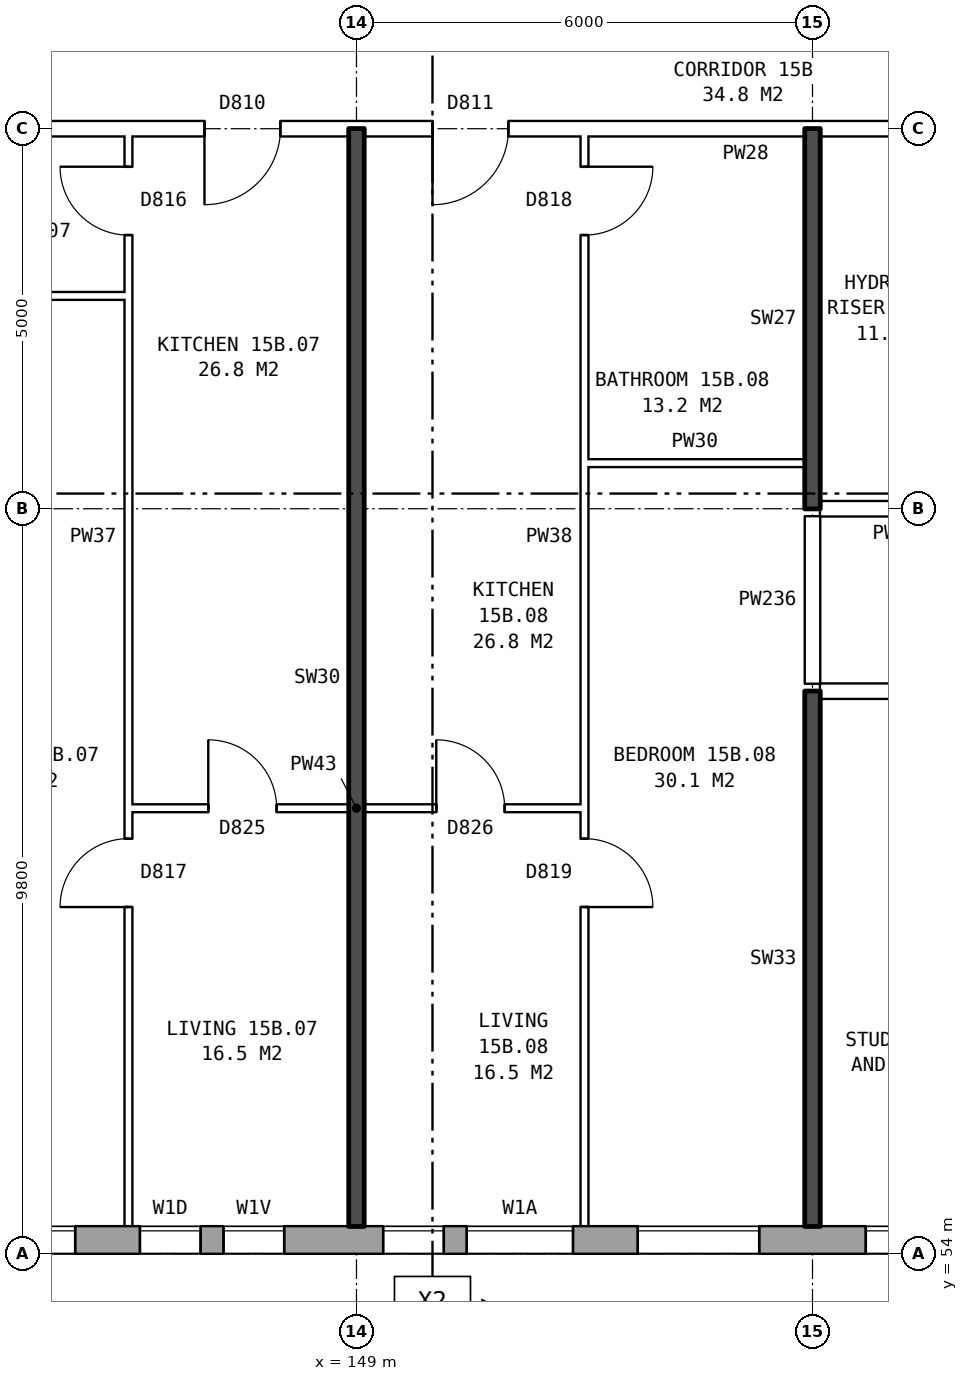
"""IFC4 building model, lengths in metres.
Left out: names, types, materials, properties, quantities, classifications, styles, units other than length and angle.
Written with IfcOpenShell. Run it as: python <this file> out.ifc"""

import sys

from ifc_helpers import new_model, si_unit, direction, frame, frame_2d, origin, place, context, subcontext, project, spatial, rectangle, extrude, element, fill, save


model = new_model("IFC4")
c1 = context("Model", 3, precision=1e-05, world=origin(), true_north=direction((0.0, 1.0)))
c2 = subcontext(c1, "Body", "Model", "MODEL_VIEW")
j1 = project(units=[si_unit("LENGTHUNIT", "METRE"), si_unit("PLANEANGLEUNIT", "RADIAN")], contexts=[c1])
p1 = place(None, origin())
s1 = spatial("IfcSite", under=j1, at=p1, CompositionType="ELEMENT")
p2 = place(p1, origin())
s2 = spatial("IfcBuilding", under=s1, at=p2, CompositionType="ELEMENT")
p3 = place(p2, frame((0.0, 0.0, 56.7)))
s3 = spatial("IfcBuildingStorey", under=s2, at=p3, CompositionType="ELEMENT", Elevation=56.7)
p4 = place(p3, frame((134.075, 54.18, 0.0), z_axis=(0.0, 0.0, 1.0), x_axis=(1.0, 0.0, 0.0)))
e1 = element("IfcWall", 1, at=p4, inside=s3, PredefinedType="STANDARD", context=c2, shape_type="SweptSolid", body=[
    extrude(rectangle(XDim=39.351, YDim=0.36, at=frame_2d((19.675, 0.0))), origin(), (0.0, 0.0, 1.0), 2.85),
])
p5 = place(p4, frame((0.625, 0.0, 0.8)))
e2 = element("IfcOpeningElement", 2, at=p5, cuts=e1, PredefinedType="OPENING", context=c2, shape_type="SweptSolid", body=[
    extrude(rectangle(XDim=1.6, YDim=1.8, at=frame_2d((0.8, 0.9))), frame((0.0, 0.19, 0.0), z_axis=(0.0, -1.0, 0.0), x_axis=(1.0, 0.0, 0.0)), (0.0, 0.0, 1.0), 0.38),
])
p6 = place(p4, frame((3.625, 0.0, 0.8)))
e3 = element("IfcOpeningElement", 3, at=p6, cuts=e1, PredefinedType="OPENING", context=c2, shape_type="SweptSolid", body=[
    extrude(rectangle(XDim=1.6, YDim=1.8, at=frame_2d((0.8, 0.9))), frame((0.0, 0.19, 0.0), z_axis=(0.0, -1.0, 0.0), x_axis=(1.0, 0.0, 0.0)), (0.0, 0.0, 1.0), 0.38),
])
p7 = place(p4, frame((6.625, 0.0, 0.8)))
e4 = element("IfcOpeningElement", 4, at=p7, cuts=e1, PredefinedType="OPENING", context=c2, shape_type="SweptSolid", body=[
    extrude(rectangle(XDim=1.6, YDim=1.8, at=frame_2d((0.8, 0.9))), frame((0.0, 0.19, 0.0), z_axis=(0.0, -1.0, 0.0), x_axis=(1.0, 0.0, 0.0)), (0.0, 0.0, 1.0), 0.38),
])
p8 = place(p4, frame((9.625, 0.0, 0.8)))
e5 = element("IfcOpeningElement", 5, at=p8, cuts=e1, PredefinedType="OPENING", context=c2, shape_type="SweptSolid", body=[
    extrude(rectangle(XDim=1.6, YDim=1.8, at=frame_2d((0.8, 0.9))), frame((0.0, 0.19, 0.0), z_axis=(0.0, -1.0, 0.0), x_axis=(1.0, 0.0, 0.0)), (0.0, 0.0, 1.0), 0.38),
])
p9 = place(p4, frame((12.075, 0.0, 0.8)))
e6 = element("IfcOpeningElement", 6, at=p9, cuts=e1, PredefinedType="OPENING", context=c2, shape_type="SweptSolid", body=[
    extrude(rectangle(XDim=0.8, YDim=1.8, at=frame_2d((0.4, 0.9))), frame((0.0, 0.19, 0.0), z_axis=(0.0, -1.0, 0.0), x_axis=(1.0, 0.0, 0.0)), (0.0, 0.0, 1.0), 0.38),
])
p10 = place(p4, frame((15.275, 0.0, 0.8)))
e7 = element("IfcOpeningElement", 7, at=p10, cuts=e1, PredefinedType="OPENING", context=c2, shape_type="SweptSolid", body=[
    extrude(rectangle(XDim=0.8, YDim=0.9, at=frame_2d((0.4, 0.45))), frame((0.0, 0.19, 0.0), z_axis=(0.0, -1.0, 0.0), x_axis=(1.0, 0.0, 0.0)), (0.0, 0.0, 1.0), 0.38),
])
p11 = place(p4, frame((18.625, 0.0, 0.8)))
e8 = element("IfcOpeningElement", 8, at=p11, cuts=e1, PredefinedType="OPENING", context=c2, shape_type="SweptSolid", body=[
    extrude(rectangle(XDim=1.6, YDim=1.8, at=frame_2d((0.8, 0.9))), frame((0.0, 0.19, 0.0), z_axis=(0.0, -1.0, 0.0), x_axis=(1.0, 0.0, 0.0)), (0.0, 0.0, 1.0), 0.38),
])
p12 = place(p4, frame((21.625, 0.0, 0.8)))
e9 = element("IfcOpeningElement", 9, at=p12, cuts=e1, PredefinedType="OPENING", context=c2, shape_type="SweptSolid", body=[
    extrude(rectangle(XDim=1.6, YDim=1.8, at=frame_2d((0.8, 0.9))), frame((0.0, 0.19, 0.0), z_axis=(0.0, -1.0, 0.0), x_axis=(1.0, 0.0, 0.0)), (0.0, 0.0, 1.0), 0.38),
])
p13 = place(p4, frame((25.275, 0.0, 1.7)))
e10 = element("IfcOpeningElement", 10, at=p13, cuts=e1, PredefinedType="OPENING", context=c2, shape_type="SweptSolid", body=[
    extrude(rectangle(XDim=1.4, YDim=0.9, at=frame_2d((0.7, 0.45))), frame((0.0, 0.19, 0.0), z_axis=(0.0, -1.0, 0.0), x_axis=(1.0, 0.0, 0.0)), (0.0, 0.0, 1.0), 0.38),
])
p14 = place(p4, frame((27.625, 0.0, 0.8)))
e11 = element("IfcOpeningElement", 11, at=p14, cuts=e1, PredefinedType="OPENING", context=c2, shape_type="SweptSolid", body=[
    extrude(rectangle(XDim=1.6, YDim=1.8, at=frame_2d((0.8, 0.9))), frame((0.0, 0.19, 0.0), z_axis=(0.0, -1.0, 0.0), x_axis=(1.0, 0.0, 0.0)), (0.0, 0.0, 1.0), 0.38),
])
p15 = place(p4, frame((30.625, 0.0, 0.8)))
e12 = element("IfcOpeningElement", 12, at=p15, cuts=e1, PredefinedType="OPENING", context=c2, shape_type="SweptSolid", body=[
    extrude(rectangle(XDim=1.6, YDim=1.8, at=frame_2d((0.8, 0.9))), frame((0.0, 0.19, 0.0), z_axis=(0.0, -1.0, 0.0), x_axis=(1.0, 0.0, 0.0)), (0.0, 0.0, 1.0), 0.38),
])
p16 = place(p4, frame((33.625, 0.0, 0.8)))
e13 = element("IfcOpeningElement", 13, at=p16, cuts=e1, PredefinedType="OPENING", context=c2, shape_type="SweptSolid", body=[
    extrude(rectangle(XDim=1.6, YDim=1.8, at=frame_2d((0.8, 0.9))), frame((0.0, 0.19, 0.0), z_axis=(0.0, -1.0, 0.0), x_axis=(1.0, 0.0, 0.0)), (0.0, 0.0, 1.0), 0.38),
])
p17 = place(p4, frame((36.625, 0.0, 0.8)))
e14 = element("IfcOpeningElement", 14, at=p17, cuts=e1, PredefinedType="OPENING", context=c2, shape_type="SweptSolid", body=[
    extrude(rectangle(XDim=1.6, YDim=1.8, at=frame_2d((0.8, 0.9))), frame((0.0, 0.19, 0.0), z_axis=(0.0, -1.0, 0.0), x_axis=(1.0, 0.0, 0.0)), (0.0, 0.0, 1.0), 0.38),
])
p18 = place(p4, frame((13.175, 0.0, 1.7)))
e15 = element("IfcOpeningElement", 15, at=p18, cuts=e1, PredefinedType="OPENING", context=c2, shape_type="SweptSolid", body=[
    extrude(rectangle(XDim=0.8, YDim=0.9, at=frame_2d((0.4, 0.45))), frame((0.0, 0.19, 0.0), z_axis=(0.0, -1.0, 0.0), x_axis=(1.0, 0.0, 0.0)), (0.0, 0.0, 1.0), 0.38),
])
p19 = place(p4, frame((16.375, 0.0, 0.8)))
e16 = element("IfcOpeningElement", 16, at=p19, cuts=e1, PredefinedType="OPENING", context=c2, shape_type="SweptSolid", body=[
    extrude(rectangle(XDim=1.4, YDim=1.8, at=frame_2d((0.7, 0.9))), frame((0.0, 0.19, 0.0), z_axis=(0.0, -1.0, 0.0), x_axis=(1.0, 0.0, 0.0)), (0.0, 0.0, 1.0), 0.38),
])
p20 = place(p3, frame((146.0, 59.86, 0.0), z_axis=(0.0, 0.0, 1.0), x_axis=(1.0, 0.0, 0.0)))
e17 = element("IfcWall", 17, at=p20, inside=s3, PredefinedType="PARTITIONING", context=c2, shape_type="SweptSolid", body=[
    extrude(rectangle(XDim=6.0, YDim=0.1, at=frame_2d((3.0, 0.0))), origin(), (0.0, 0.0, 1.0), 2.85),
])
p21 = place(p20, frame((1.05, 0.0, 0.0)))
e18 = element("IfcOpeningElement", 18, at=p21, cuts=e17, PredefinedType="OPENING", context=c2, shape_type="SweptSolid", body=[
    extrude(rectangle(XDim=0.9, YDim=2.1, at=frame_2d((0.45, 1.05))), frame((0.0, 0.06, 0.0), z_axis=(0.0, -1.0, 0.0), x_axis=(1.0, 0.0, 0.0)), (0.0, 0.0, 1.0), 0.12),
])
p22 = place(p20, frame((4.05, 0.0, 0.0)))
e19 = element("IfcOpeningElement", 19, at=p22, cuts=e17, PredefinedType="OPENING", context=c2, shape_type="SweptSolid", body=[
    extrude(rectangle(XDim=0.9, YDim=2.1, at=frame_2d((0.45, 1.05))), frame((0.0, 0.06, 0.0), z_axis=(0.0, -1.0, 0.0), x_axis=(1.0, 0.0, 0.0)), (0.0, 0.0, 1.0), 0.12),
])
p23 = place(p3, frame((155.1, 61.4, 0.0), z_axis=(0.0, 0.0, 1.0), x_axis=(1.0, 0.0, 0.0)))
e20 = element("IfcWall", 20, at=p23, inside=s3, PredefinedType="PARTITIONING", context=c2, shape_type="SweptSolid", body=[
    extrude(rectangle(XDim=21.04, YDim=0.2, at=frame_2d((10.52, 0.0))), origin(), (0.0, 0.0, 1.0), 2.85),
])
p24 = place(p23, frame((1.45, 0.0, 0.0)))
e21 = element("IfcOpeningElement", 21, at=p24, cuts=e20, PredefinedType="OPENING", context=c2, shape_type="SweptSolid", body=[
    extrude(rectangle(XDim=1.0, YDim=2.1, at=frame_2d((0.5, 1.05))), frame((0.0, 0.11, 0.0), z_axis=(0.0, -1.0, 0.0), x_axis=(1.0, 0.0, 0.0)), (0.0, 0.0, 1.0), 0.22),
])
p25 = place(p23, frame((7.4, 0.0, 0.0)))
e22 = element("IfcOpeningElement", 22, at=p25, cuts=e20, PredefinedType="OPENING", context=c2, shape_type="SweptSolid", body=[
    extrude(rectangle(XDim=1.0, YDim=2.1, at=frame_2d((0.5, 1.05))), frame((0.0, 0.11, 0.0), z_axis=(0.0, -1.0, 0.0), x_axis=(1.0, 0.0, 0.0)), (0.0, 0.0, 1.0), 0.22),
])
p26 = place(p23, frame((14.4, 0.0, 0.0)))
e23 = element("IfcOpeningElement", 23, at=p26, cuts=e20, PredefinedType="OPENING", context=c2, shape_type="SweptSolid", body=[
    extrude(rectangle(XDim=1.0, YDim=2.1, at=frame_2d((0.5, 1.05))), frame((0.0, 0.11, 0.0), z_axis=(0.0, -1.0, 0.0), x_axis=(1.0, 0.0, 0.0)), (0.0, 0.0, 1.0), 0.22),
])
p27 = place(p3, frame((155.1, 63.8, 0.0), z_axis=(0.0, 0.0, 1.0), x_axis=(1.0, 0.0, 0.0)))
e24 = element("IfcWall", 24, at=p27, inside=s3, PredefinedType="PARTITIONING", context=c2, shape_type="SweptSolid", body=[
    extrude(rectangle(XDim=2.14, YDim=0.2, at=frame_2d((1.07, 0.0))), origin(), (0.0, 0.0, 1.0), 2.85),
])
p28 = place(p3, frame((152.0, 64.4, 0.0), z_axis=(0.0, 0.0, 1.0), x_axis=(1.0, 0.0, 0.0)))
e25 = element("IfcWall", 25, at=p28, inside=s3, PredefinedType="PARTITIONING", context=c2, shape_type="SweptSolid", body=[
    extrude(rectangle(XDim=2.9, YDim=0.1, at=frame_2d((1.45, 0.0))), origin(), (0.0, 0.0, 1.0), 2.85),
])
p29 = place(p3, frame((142.76, 66.6, 0.0), z_axis=(0.0, 0.0, 1.0), x_axis=(1.0, 0.0, 0.0)))
e26 = element("IfcWall", 26, at=p29, inside=s3, PredefinedType="PARTITIONING", context=c2, shape_type="SweptSolid", body=[
    extrude(rectangle(XDim=3.24, YDim=0.1, at=frame_2d((1.62, 0.0))), origin(), (0.0, 0.0, 1.0), 2.85),
])
p30 = place(p3, frame((142.76, 68.8, 0.0), z_axis=(0.0, 0.0, 1.0), x_axis=(1.0, 0.0, 0.0)))
e27 = element("IfcWall", 27, at=p30, inside=s3, PredefinedType="PARTITIONING", context=c2, shape_type="SweptSolid", body=[
    extrude(rectangle(XDim=14.48, YDim=0.2, at=frame_2d((7.24, 0.0))), origin(), (0.0, 0.0, 1.0), 2.85),
])
p31 = place(p30, frame((4.24, 0.0, 0.0)))
e28 = element("IfcOpeningElement", 28, at=p31, cuts=e27, PredefinedType="OPENING", context=c2, shape_type="SweptSolid", body=[
    extrude(rectangle(XDim=1.0, YDim=2.1, at=frame_2d((0.5, 1.05))), frame((0.0, 0.11, 0.0), z_axis=(0.0, -1.0, 0.0), x_axis=(1.0, 0.0, 0.0)), (0.0, 0.0, 1.0), 0.22),
])
p32 = place(p30, frame((7.24, 0.0, 0.0)))
e29 = element("IfcOpeningElement", 29, at=p32, cuts=e27, PredefinedType="OPENING", context=c2, shape_type="SweptSolid", body=[
    extrude(rectangle(XDim=1.0, YDim=2.1, at=frame_2d((0.5, 1.05))), frame((0.0, 0.11, 0.0), z_axis=(0.0, -1.0, 0.0), x_axis=(1.0, 0.0, 0.0)), (0.0, 0.0, 1.0), 0.22),
])
p33 = place(p3, frame((146.0, 54.36, 0.0), z_axis=(0.0, 0.0, 1.0), x_axis=(0.0, 1.0, 0.0)))
e30 = element("IfcWall", 30, at=p33, inside=s3, PredefinedType="PARTITIONING", context=c2, shape_type="SweptSolid", body=[
    extrude(rectangle(XDim=14.34, YDim=0.1, at=frame_2d((7.17, 0.0))), origin(), (0.0, 0.0, 1.0), 2.85),
])
p34 = place(p33, frame((4.2, 0.0, 0.0)))
e31 = element("IfcOpeningElement", 31, at=p34, cuts=e30, PredefinedType="OPENING", context=c2, shape_type="SweptSolid", body=[
    extrude(rectangle(XDim=0.9, YDim=2.1, at=frame_2d((0.45, 1.05))), frame((0.0, 0.06, 0.0), z_axis=(0.0, -1.0, 0.0), x_axis=(1.0, 0.0, 0.0)), (0.0, 0.0, 1.0), 0.12),
])
p35 = place(p33, frame((13.04, 0.0, 0.0)))
e32 = element("IfcOpeningElement", 32, at=p35, cuts=e30, PredefinedType="OPENING", context=c2, shape_type="SweptSolid", body=[
    extrude(rectangle(XDim=0.9, YDim=2.1, at=frame_2d((0.45, 1.05))), frame((0.0, 0.06, 0.0), z_axis=(0.0, -1.0, 0.0), x_axis=(1.0, 0.0, 0.0)), (0.0, 0.0, 1.0), 0.12),
])
p36 = place(p3, frame((149.0, 54.36, 0.0), z_axis=(0.0, 0.0, 1.0), x_axis=(0.0, 1.0, 0.0)))
e33 = element("IfcWall", 33, at=p36, inside=s3, PredefinedType="SOLIDWALL", context=c2, shape_type="SweptSolid", body=[
    extrude(rectangle(XDim=14.44, YDim=0.2, at=frame_2d((7.22, 0.0))), origin(), (0.0, 0.0, 1.0), 2.85),
])
p37 = place(p3, frame((152.0, 54.36, 0.0), z_axis=(0.0, 0.0, 1.0), x_axis=(0.0, 1.0, 0.0)))
e34 = element("IfcWall", 34, at=p37, inside=s3, PredefinedType="PARTITIONING", context=c2, shape_type="SweptSolid", body=[
    extrude(rectangle(XDim=14.34, YDim=0.1, at=frame_2d((7.17, 0.0))), origin(), (0.0, 0.0, 1.0), 2.85),
])
p38 = place(p37, frame((4.2, 0.0, 0.0)))
e35 = element("IfcOpeningElement", 35, at=p38, cuts=e34, PredefinedType="OPENING", context=c2, shape_type="SweptSolid", body=[
    extrude(rectangle(XDim=0.9, YDim=2.1, at=frame_2d((0.45, 1.05))), frame((0.0, 0.06, 0.0), z_axis=(0.0, -1.0, 0.0), x_axis=(1.0, 0.0, 0.0)), (0.0, 0.0, 1.0), 0.12),
])
p39 = place(p37, frame((13.04, 0.0, 0.0)))
e36 = element("IfcOpeningElement", 36, at=p39, cuts=e34, PredefinedType="OPENING", context=c2, shape_type="SweptSolid", body=[
    extrude(rectangle(XDim=0.9, YDim=2.1, at=frame_2d((0.45, 1.05))), frame((0.0, 0.06, 0.0), z_axis=(0.0, -1.0, 0.0), x_axis=(1.0, 0.0, 0.0)), (0.0, 0.0, 1.0), 0.12),
])
p40 = place(p3, frame((155.0, 54.36, 0.0), z_axis=(0.0, 0.0, 1.0), x_axis=(0.0, 1.0, 0.0)))
e37 = element("IfcWall", 37, at=p40, inside=s3, PredefinedType="SOLIDWALL", context=c2, shape_type="SweptSolid", body=[
    extrude(rectangle(XDim=7.04, YDim=0.2, at=frame_2d((3.52, 0.0))), origin(), (0.0, 0.0, 1.0), 2.85),
])
p41 = place(p3, frame((155.0, 61.5, 0.0), z_axis=(0.0, 0.0, 1.0), x_axis=(0.0, 1.0, 0.0)))
e38 = element("IfcWall", 38, at=p41, inside=s3, PredefinedType="PARTITIONING", context=c2, shape_type="SweptSolid", body=[
    extrude(rectangle(XDim=2.2, YDim=0.2, at=frame_2d((1.1, 0.0))), origin(), (0.0, 0.0, 1.0), 2.85),
])
p42 = place(p3, frame((155.0, 63.8, 0.0), z_axis=(0.0, 0.0, 1.0), x_axis=(0.0, 1.0, 0.0)))
e39 = element("IfcWall", 39, at=p42, inside=s3, PredefinedType="SOLIDWALL", context=c2, shape_type="SweptSolid", body=[
    extrude(rectangle(XDim=5.0, YDim=0.2, at=frame_2d((2.5, 0.0))), origin(), (0.0, 0.0, 1.0), 2.85),
])
p43 = place(p8, origin())
e40 = element("IfcWindow", 40, at=p43, inside=s3, PartitioningType="SINGLE_PANEL", PredefinedType="WINDOW", context=c2, shape_type="SweptSolid", body=[
    extrude(rectangle(XDim=1.6, YDim=1.8, at=frame_2d((0.8, 0.9))), frame((0.0, 0.15, 0.0), z_axis=(0.0, -1.0, 0.0), x_axis=(1.0, 0.0, 0.0)), (0.0, 0.0, 1.0), 0.06),
])
fill(e5, e40)
p44 = place(p9, origin())
e41 = element("IfcWindow", 41, at=p44, inside=s3, PartitioningType="SINGLE_PANEL", PredefinedType="WINDOW", context=c2, shape_type="SweptSolid", body=[
    extrude(rectangle(XDim=0.8, YDim=1.8, at=frame_2d((0.4, 0.9))), frame((0.0, 0.15, 0.0), z_axis=(0.0, -1.0, 0.0), x_axis=(1.0, 0.0, 0.0)), (0.0, 0.0, 1.0), 0.06),
])
fill(e6, e41)
p45 = place(p10, origin())
e42 = element("IfcWindow", 42, at=p45, inside=s3, PartitioningType="SINGLE_PANEL", PredefinedType="WINDOW", context=c2, shape_type="SweptSolid", body=[
    extrude(rectangle(XDim=0.8, YDim=0.9, at=frame_2d((0.4, 0.45))), frame((0.0, 0.15, 0.0), z_axis=(0.0, -1.0, 0.0), x_axis=(1.0, 0.0, 0.0)), (0.0, 0.0, 1.0), 0.06),
])
fill(e7, e42)
p46 = place(p11, origin())
e43 = element("IfcWindow", 43, at=p46, inside=s3, PartitioningType="SINGLE_PANEL", PredefinedType="WINDOW", context=c2, shape_type="SweptSolid", body=[
    extrude(rectangle(XDim=1.6, YDim=1.8, at=frame_2d((0.8, 0.9))), frame((0.0, 0.15, 0.0), z_axis=(0.0, -1.0, 0.0), x_axis=(1.0, 0.0, 0.0)), (0.0, 0.0, 1.0), 0.06),
])
fill(e8, e43)
p47 = place(p12, origin())
e44 = element("IfcWindow", 44, at=p47, inside=s3, PartitioningType="SINGLE_PANEL", PredefinedType="WINDOW", context=c2, shape_type="SweptSolid", body=[
    extrude(rectangle(XDim=1.6, YDim=1.8, at=frame_2d((0.8, 0.9))), frame((0.0, 0.15, 0.0), z_axis=(0.0, -1.0, 0.0), x_axis=(1.0, 0.0, 0.0)), (0.0, 0.0, 1.0), 0.06),
])
fill(e9, e44)
p48 = place(p34, origin())
e45 = element("IfcDoor", 45, at=p48, inside=s3, OperationType="SINGLE_SWING_LEFT", PredefinedType="DOOR", context=c2, shape_type="SweptSolid", body=[
    extrude(rectangle(XDim=0.9, YDim=2.1, at=frame_2d((0.45, 1.05))), frame((0.0, 0.025, 0.0), z_axis=(0.0, -1.0, 0.0), x_axis=(1.0, 0.0, 0.0)), (0.0, 0.0, 1.0), 0.05),
])
fill(e31, e45)
p49 = place(p31, frame((1.0, 0.0, 0.0), z_axis=(0.0, 0.0, 1.0), x_axis=(-1.0, 0.0, 0.0)))
e46 = element("IfcDoor", 46, at=p49, inside=s3, OperationType="SINGLE_SWING_RIGHT", PredefinedType="DOOR", context=c2, shape_type="SweptSolid", body=[
    extrude(rectangle(XDim=1.0, YDim=2.1, at=frame_2d((0.5, 1.05))), frame((0.0, 0.025, 0.0), z_axis=(0.0, -1.0, 0.0), x_axis=(1.0, 0.0, 0.0)), (0.0, 0.0, 1.0), 0.05),
])
fill(e28, e46)
p50 = place(p21, origin())
e47 = element("IfcDoor", 47, at=p50, inside=s3, OperationType="SINGLE_SWING_LEFT", PredefinedType="DOOR", context=c2, shape_type="SweptSolid", body=[
    extrude(rectangle(XDim=0.9, YDim=2.1, at=frame_2d((0.45, 1.05))), frame((0.0, 0.025, 0.0), z_axis=(0.0, -1.0, 0.0), x_axis=(1.0, 0.0, 0.0)), (0.0, 0.0, 1.0), 0.05),
])
fill(e18, e47)
p51 = place(p35, origin())
e48 = element("IfcDoor", 48, at=p51, inside=s3, OperationType="SINGLE_SWING_RIGHT", PredefinedType="DOOR", context=c2, shape_type="SweptSolid", body=[
    extrude(rectangle(XDim=0.9, YDim=2.1, at=frame_2d((0.45, 1.05))), frame((0.0, 0.025, 0.0), z_axis=(0.0, -1.0, 0.0), x_axis=(1.0, 0.0, 0.0)), (0.0, 0.0, 1.0), 0.05),
])
fill(e32, e48)
p52 = place(p38, frame((0.9, 0.0, 0.0), z_axis=(0.0, 0.0, 1.0), x_axis=(-1.0, 0.0, 0.0)))
e49 = element("IfcDoor", 49, at=p52, inside=s3, OperationType="SINGLE_SWING_RIGHT", PredefinedType="DOOR", context=c2, shape_type="SweptSolid", body=[
    extrude(rectangle(XDim=0.9, YDim=2.1, at=frame_2d((0.45, 1.05))), frame((0.0, 0.025, 0.0), z_axis=(0.0, -1.0, 0.0), x_axis=(1.0, 0.0, 0.0)), (0.0, 0.0, 1.0), 0.05),
])
fill(e35, e49)
p53 = place(p32, frame((1.0, 0.0, 0.0), z_axis=(0.0, 0.0, 1.0), x_axis=(-1.0, 0.0, 0.0)))
e50 = element("IfcDoor", 50, at=p53, inside=s3, OperationType="SINGLE_SWING_RIGHT", PredefinedType="DOOR", context=c2, shape_type="SweptSolid", body=[
    extrude(rectangle(XDim=1.0, YDim=2.1, at=frame_2d((0.5, 1.05))), frame((0.0, 0.025, 0.0), z_axis=(0.0, -1.0, 0.0), x_axis=(1.0, 0.0, 0.0)), (0.0, 0.0, 1.0), 0.05),
])
fill(e29, e50)
p54 = place(p22, origin())
e51 = element("IfcDoor", 51, at=p54, inside=s3, OperationType="SINGLE_SWING_LEFT", PredefinedType="DOOR", context=c2, shape_type="SweptSolid", body=[
    extrude(rectangle(XDim=0.9, YDim=2.1, at=frame_2d((0.45, 1.05))), frame((0.0, 0.025, 0.0), z_axis=(0.0, -1.0, 0.0), x_axis=(1.0, 0.0, 0.0)), (0.0, 0.0, 1.0), 0.05),
])
fill(e19, e51)
p55 = place(p39, frame((0.9, 0.0, 0.0), z_axis=(0.0, 0.0, 1.0), x_axis=(-1.0, 0.0, 0.0)))
e52 = element("IfcDoor", 52, at=p55, inside=s3, OperationType="SINGLE_SWING_LEFT", PredefinedType="DOOR", context=c2, shape_type="SweptSolid", body=[
    extrude(rectangle(XDim=0.9, YDim=2.1, at=frame_2d((0.45, 1.05))), frame((0.0, 0.025, 0.0), z_axis=(0.0, -1.0, 0.0), x_axis=(1.0, 0.0, 0.0)), (0.0, 0.0, 1.0), 0.05),
])
fill(e36, e52)
p56 = place(p18, origin())
e53 = element("IfcWindow", 53, at=p56, inside=s3, PartitioningType="SINGLE_PANEL", PredefinedType="WINDOW", context=c2, shape_type="SweptSolid", body=[
    extrude(rectangle(XDim=0.8, YDim=0.9, at=frame_2d((0.4, 0.45))), frame((0.0, 0.15, 0.0), z_axis=(0.0, -1.0, 0.0), x_axis=(1.0, 0.0, 0.0)), (0.0, 0.0, 1.0), 0.06),
])
fill(e15, e53)
p57 = place(p19, origin())
e54 = element("IfcWindow", 54, at=p57, inside=s3, PartitioningType="SINGLE_PANEL", PredefinedType="WINDOW", context=c2, shape_type="SweptSolid", body=[
    extrude(rectangle(XDim=1.4, YDim=1.8, at=frame_2d((0.7, 0.9))), frame((0.0, 0.15, 0.0), z_axis=(0.0, -1.0, 0.0), x_axis=(1.0, 0.0, 0.0)), (0.0, 0.0, 1.0), 0.06),
])
fill(e16, e54)
save(model, sys.argv[1])
